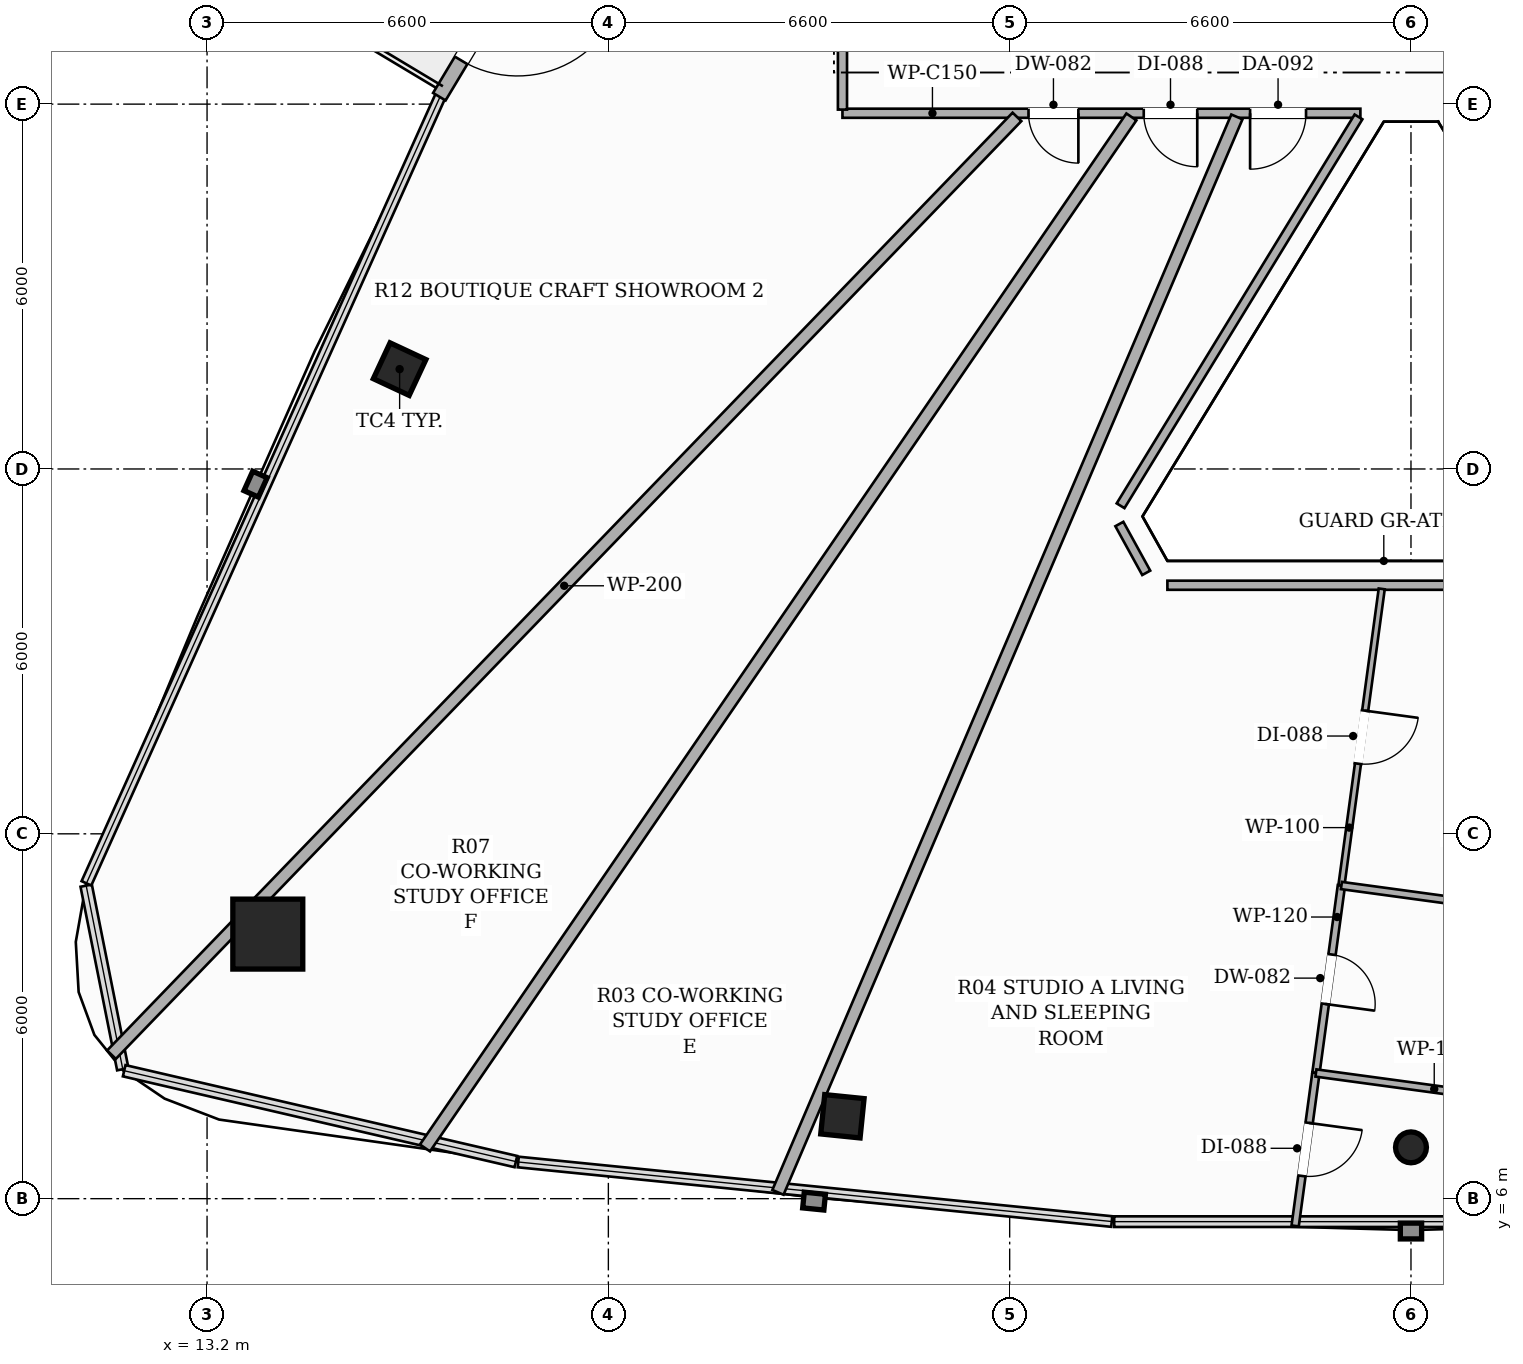
"""IFC4 building model, lengths in metres.
Left out: names, types, materials, properties, quantities, classifications, styles, units other than length and angle.
Written with IfcOpenShell. Run it as: python <this file> out.ifc"""

import sys

from ifc_helpers import new_model, si_unit, direction, frame, frame_2d, origin, origin_2d, place, context, subcontext, project, spatial, rectangle, hollow_rectangle, hollow_circle, extrude, element, fill, save


model = new_model("IFC4")
c1 = context("Model", 3, precision=1e-05, world=origin(), true_north=direction((0.0, 1.0)))
c2 = subcontext(c1, "Body", "Model", "MODEL_VIEW")
j1 = project(units=[si_unit("LENGTHUNIT", "METRE"), si_unit("PLANEANGLEUNIT", "RADIAN")], contexts=[c1])
p1 = place(None, origin())
s1 = spatial("IfcSite", under=j1, at=p1, CompositionType="ELEMENT")
p2 = place(p1, origin())
s2 = spatial("IfcBuilding", under=s1, at=p2, CompositionType="ELEMENT")
p3 = place(p2, frame((0.0, 0.0, 260.15)))
s3 = spatial("IfcBuildingStorey", under=s2, at=p3, CompositionType="ELEMENT", Elevation=260.15)
p4 = place(p3, frame((14.199, 10.351, 0.0), z_axis=(0.0, 0.0, 1.0), x_axis=(1.0, 0.0, 0.0)))
e1 = element("IfcColumn", 1, at=p4, inside=s3, PredefinedType="COLUMN", context=c2, shape_type="SweptSolid", body=[
    extrude(hollow_rectangle(XDim=1.15, YDim=1.15, WallThickness=0.036, at=origin_2d()), origin(), (0.0, 0.0, 1.0), 3.3),
])
for number, where, z_axis, x_axis in (
    (2, (16.367, 19.642, 0.0), (0.0, 0.0, 1.0), (0.423, 0.906, 0.0)),
    (3, (23.649, 7.355, 0.0), (0.0, 0.0, 1.0), (-0.995, 0.101, 0.0)),
):
    element("IfcColumn", number, at=place(p3, frame(where, z_axis=z_axis, x_axis=x_axis)), inside=s3, PredefinedType="COLUMN", context=c2, shape_type="SweptSolid", body=[
        extrude(hollow_rectangle(XDim=0.65, YDim=0.65, WallThickness=0.022, at=origin_2d()), origin(), (0.0, 0.0, 1.0), 3.3),
    ])
p5 = place(p3, frame((33.0, 6.844, 0.0), z_axis=(0.0, 0.0, 1.0), x_axis=(1.0, 0.0, 0.0)))
e4 = element("IfcColumn", 4, at=p5, inside=s3, PredefinedType="COLUMN", context=c2, shape_type="SweptSolid", body=[
    extrude(hollow_circle(Radius=0.254, WallThickness=0.016, at=origin_2d()), origin(), (0.0, 0.0, 1.0), 3.3),
])
p6 = place(p3, frame((21.988, 32.405, 0.0), z_axis=(0.0, 0.0, 1.0), x_axis=(-0.514361929684, -0.857573206958, 0.0)))
e5 = element("IfcWall", 5, at=p6, inside=s3, PredefinedType="SOLIDWALL", context=c2, shape_type="SweptSolid", body=[
    extrude(rectangle(XDim=9.659, YDim=0.24, at=frame_2d((4.829, 0.0))), origin(), (0.0, 0.0, 1.0), 2.624),
])
p7 = place(p6, frame((7.162, 0.0, 0.0)))
e6 = element("IfcOpeningElement", 6, at=p7, cuts=e5, PredefinedType="OPENING", context=c2, shape_type="SweptSolid", body=[
    extrude(rectangle(XDim=1.8, YDim=2.2, at=frame_2d((0.9, 1.1))), frame((0.0, 0.13, 0.0), z_axis=(0.0, -1.0, 0.0), x_axis=(1.0, 0.0, 0.0)), (0.0, 0.0, 1.0), 0.26),
])
p8 = place(p3, frame((32.168, 23.85, 0.0), z_axis=(0.0, 0.0, 1.0), x_axis=(-1.0, 0.0, 0.0)))
e7 = element("IfcWall", 7, at=p8, inside=s3, PredefinedType="PARTITIONING", context=c2, shape_type="SweptSolid", body=[
    extrude(rectangle(XDim=8.518, YDim=0.15, at=frame_2d((4.259, 0.0))), origin(), (0.0, 0.0, 1.0), 2.565),
])
p9 = place(p8, frame((0.894, 0.0, 0.0)))
e8 = element("IfcOpeningElement", 8, at=p9, cuts=e7, PredefinedType="OPENING", context=c2, shape_type="SweptSolid", body=[
    extrude(rectangle(XDim=0.92, YDim=2.15, at=frame_2d((0.46, 1.075))), frame((0.0, 0.085, 0.0), z_axis=(0.0, -1.0, 0.0), x_axis=(1.0, 0.0, 0.0)), (0.0, 0.0, 1.0), 0.17),
])
p10 = place(p8, frame((2.683, 0.0, 0.0)))
e9 = element("IfcOpeningElement", 9, at=p10, cuts=e7, PredefinedType="OPENING", context=c2, shape_type="SweptSolid", body=[
    extrude(rectangle(XDim=0.88, YDim=2.1, at=frame_2d((0.44, 1.05))), frame((0.0, 0.085, 0.0), z_axis=(0.0, -1.0, 0.0), x_axis=(1.0, 0.0, 0.0)), (0.0, 0.0, 1.0), 0.17),
])
p11 = place(p8, frame((4.638, 0.0, 0.0)))
e10 = element("IfcOpeningElement", 10, at=p11, cuts=e7, PredefinedType="OPENING", context=c2, shape_type="SweptSolid", body=[
    extrude(rectangle(XDim=0.82, YDim=2.1, at=frame_2d((0.41, 1.05))), frame((0.0, 0.085, 0.0), z_axis=(0.0, -1.0, 0.0), x_axis=(1.0, 0.0, 0.0)), (0.0, 0.0, 1.0), 0.17),
])
p12 = place(p3, frame((23.65, 23.91, 0.0), z_axis=(0.0, 0.0, 1.0), x_axis=(0.0, 1.0, 0.0)))
e11 = element("IfcWall", 11, at=p12, inside=s3, PredefinedType="PARTITIONING", context=c2, shape_type="SweptSolid", body=[
    extrude(rectangle(XDim=10.784, YDim=0.15, at=frame_2d((5.392, 0.0))), origin(), (0.0, 0.0, 1.0), 2.492),
])
p13 = place(p12, frame((4.952, 0.0, 0.0)))
e12 = element("IfcOpeningElement", 12, at=p13, cuts=e11, PredefinedType="OPENING", context=c2, shape_type="SweptSolid", body=[
    extrude(rectangle(XDim=0.88, YDim=2.1, at=frame_2d((0.44, 1.05))), frame((0.0, 0.085, 0.0), z_axis=(0.0, -1.0, 0.0), x_axis=(1.0, 0.0, 0.0)), (0.0, 0.0, 1.0), 0.17),
])
p14 = place(p3, frame((37.006, 16.088, 0.0), z_axis=(0.0, 0.0, 1.0), x_axis=(-1.0, 0.0, 0.0)))
e13 = element("IfcWall", 13, at=p14, inside=s3, PredefinedType="PARTITIONING", context=c2, shape_type="SweptSolid", body=[
    extrude(rectangle(XDim=8.012, YDim=0.15, at=frame_2d((4.006, 0.0))), origin(), (0.0, 0.0, 1.0), 2.773),
])
p15 = place(p3, frame((28.646, 16.292, 0.0), z_axis=(0.0, 0.0, 1.0), x_axis=(-0.482133469033, 0.876097778811, 0.0)))
e14 = element("IfcWall", 14, at=p15, inside=s3, PredefinedType="PARTITIONING", context=c2, shape_type="SweptSolid", body=[
    extrude(rectangle(XDim=0.917, YDim=0.15, at=frame_2d((0.458, 0.0))), origin(), (0.0, 0.0, 1.0), 3.06),
])
p16 = place(p3, frame((28.224, 17.395, 0.0), z_axis=(0.0, 0.0, 1.0), x_axis=(0.521913594497, 0.852998358661, 0.0)))
e15 = element("IfcWall", 15, at=p16, inside=s3, PredefinedType="PARTITIONING", context=c2, shape_type="SweptSolid", body=[
    extrude(rectangle(XDim=7.497, YDim=0.15, at=frame_2d((3.749, 0.0))), origin(), (0.0, 0.0, 1.0), 2.773),
])
p17 = place(p3, frame((26.52, 23.79, 0.0), z_axis=(0.0, 0.0, 1.0), x_axis=(-0.694637190704, -0.719360252788, 0.0)))
e16 = element("IfcWall", 16, at=p17, inside=s3, PredefinedType="PARTITIONING", context=c2, shape_type="SweptSolid", body=[
    extrude(rectangle(XDim=21.439, YDim=0.2, at=frame_2d((10.719, 0.0))), origin(), (0.0, 0.0, 1.0), 2.492),
])
p18 = place(p3, frame((22.589, 6.104, 0.0), z_axis=(0.0, 0.0, 1.0), x_axis=(0.392518309842, 0.919744190761, 0.0)))
e17 = element("IfcWall", 17, at=p18, inside=s3, PredefinedType="PARTITIONING", context=c2, shape_type="SweptSolid", body=[
    extrude(rectangle(XDim=19.229, YDim=0.2, at=frame_2d((9.615, 0.0))), origin(), (0.0, 0.0, 1.0), 2.492),
])
p19 = place(p3, frame((16.784, 6.834, 0.0), z_axis=(0.0, 0.0, 1.0), x_axis=(0.565235631435, 0.824929500598, 0.0)))
e18 = element("IfcWall", 18, at=p19, inside=s3, PredefinedType="PARTITIONING", context=c2, shape_type="SweptSolid", body=[
    extrude(rectangle(XDim=20.554, YDim=0.2, at=frame_2d((10.277, 0.0))), origin(), (0.0, 0.0, 1.0), 2.492),
])
p20 = place(p3, frame((31.856, 11.15, 0.0), z_axis=(0.0, 0.0, 1.0), x_axis=(-0.134650977284, -0.990893089246, 0.0)))
e19 = element("IfcWall", 19, at=p20, inside=s3, PredefinedType="PARTITIONING", context=c2, shape_type="SweptSolid", body=[
    extrude(rectangle(XDim=3.111, YDim=0.12, at=frame_2d((1.556, 0.0))), origin(), (0.0, 0.0, 1.0), 3.06),
])
p21 = place(p20, frame((1.146, 0.0, 0.0)))
e20 = element("IfcOpeningElement", 20, at=p21, cuts=e19, PredefinedType="OPENING", context=c2, shape_type="SweptSolid", body=[
    extrude(rectangle(XDim=0.82, YDim=2.1, at=frame_2d((0.41, 1.05))), frame((0.0, 0.07, 0.0), z_axis=(0.0, -1.0, 0.0), x_axis=(1.0, 0.0, 0.0)), (0.0, 0.0, 1.0), 0.14),
])
p22 = place(p3, frame((31.437, 8.067, 0.0), z_axis=(0.0, 0.0, 1.0), x_axis=(-0.134765499074, -0.990877520312, 0.0)))
e21 = element("IfcWall", 21, at=p22, inside=s3, PredefinedType="PARTITIONING", context=c2, shape_type="SweptSolid", body=[
    extrude(rectangle(XDim=2.538, YDim=0.12, at=frame_2d((1.269, 0.0))), origin(), (0.0, 0.0, 1.0), 2.492),
])
p23 = place(p22, frame((0.829, 0.0, 0.0)))
e22 = element("IfcOpeningElement", 22, at=p23, cuts=e21, PredefinedType="OPENING", context=c2, shape_type="SweptSolid", body=[
    extrude(rectangle(XDim=0.88, YDim=2.1, at=frame_2d((0.44, 1.05))), frame((0.0, 0.07, 0.0), z_axis=(0.0, -1.0, 0.0), x_axis=(1.0, 0.0, 0.0)), (0.0, 0.0, 1.0), 0.14),
])
p24 = place(p3, frame((32.519, 16.028, 0.0), z_axis=(0.0, 0.0, 1.0), x_axis=(-0.134690507908, -0.990887716686, 0.0)))
e23 = element("IfcWall", 23, at=p24, inside=s3, PredefinedType="PARTITIONING", context=c2, shape_type="SweptSolid", body=[
    extrude(rectangle(XDim=4.923, YDim=0.1, at=frame_2d((2.461, 0.0))), origin(), (0.0, 0.0, 1.0), 3.06),
])
p25 = place(p24, frame((2.021, 0.0, 0.0)))
e24 = element("IfcOpeningElement", 24, at=p25, cuts=e23, PredefinedType="OPENING", context=c2, shape_type="SweptSolid", body=[
    extrude(rectangle(XDim=0.88, YDim=2.1, at=frame_2d((0.44, 1.05))), frame((0.0, 0.06, 0.0), z_axis=(0.0, -1.0, 0.0), x_axis=(1.0, 0.0, 0.0)), (0.0, 0.0, 1.0), 0.12),
])
p26 = place(p3, frame((35.328, 7.538, 0.0), z_axis=(0.0, 0.0, 1.0), x_axis=(-0.990890227425, 0.134672035678, 0.0)))
e25 = element("IfcWall", 25, at=p26, inside=s3, PredefinedType="PARTITIONING", context=c2, shape_type="SweptSolid", body=[
    extrude(rectangle(XDim=3.927, YDim=0.12, at=frame_2d((1.963, 0.0))), origin(), (0.0, 0.0, 1.0), 2.773),
])
p27 = place(p3, frame((31.856, 11.15, 0.0), z_axis=(0.0, 0.0, 1.0), x_axis=(0.990862518896, -0.13487575263, 0.0)))
e26 = element("IfcWall", 26, at=p27, inside=s3, PredefinedType="PARTITIONING", context=c2, shape_type="SweptSolid", body=[
    extrude(rectangle(XDim=3.166, YDim=0.12, at=frame_2d((1.583, 0.0))), origin(), (0.0, 0.0, 1.0), 2.773),
])
p28 = place(p7, origin())
e27 = element("IfcDoor", 27, at=p28, inside=s3, OperationType="SINGLE_SWING_LEFT", PredefinedType="DOOR", context=c2, shape_type="SweptSolid", body=[
    extrude(rectangle(XDim=1.8, YDim=2.2, at=frame_2d((0.9, 1.1))), frame((0.0, 0.025, 0.0), z_axis=(0.0, -1.0, 0.0), x_axis=(1.0, 0.0, 0.0)), (0.0, 0.0, 1.0), 0.05),
])
fill(e6, e27)
p29 = place(p9, origin())
e28 = element("IfcDoor", 28, at=p29, inside=s3, OperationType="SINGLE_SWING_RIGHT", PredefinedType="DOOR", context=c2, shape_type="SweptSolid", body=[
    extrude(rectangle(XDim=0.92, YDim=2.15, at=frame_2d((0.46, 1.075))), frame((0.0, 0.025, 0.0), z_axis=(0.0, -1.0, 0.0), x_axis=(1.0, 0.0, 0.0)), (0.0, 0.0, 1.0), 0.05),
])
fill(e8, e28)
p30 = place(p21, origin())
e29 = element("IfcDoor", 29, at=p30, inside=s3, OperationType="SINGLE_SWING_RIGHT", PredefinedType="DOOR", context=c2, shape_type="SweptSolid", body=[
    extrude(rectangle(XDim=0.82, YDim=2.1, at=frame_2d((0.41, 1.05))), frame((0.0, 0.025, 0.0), z_axis=(0.0, -1.0, 0.0), x_axis=(1.0, 0.0, 0.0)), (0.0, 0.0, 1.0), 0.05),
])
fill(e20, e29)
p31 = place(p23, origin())
e30 = element("IfcDoor", 30, at=p31, inside=s3, OperationType="SINGLE_SWING_LEFT", PredefinedType="DOOR", context=c2, shape_type="SweptSolid", body=[
    extrude(rectangle(XDim=0.88, YDim=2.1, at=frame_2d((0.44, 1.05))), frame((0.0, 0.025, 0.0), z_axis=(0.0, -1.0, 0.0), x_axis=(1.0, 0.0, 0.0)), (0.0, 0.0, 1.0), 0.05),
])
fill(e22, e30)
p32 = place(p25, origin())
e31 = element("IfcDoor", 31, at=p32, inside=s3, OperationType="SINGLE_SWING_LEFT", PredefinedType="DOOR", context=c2, shape_type="SweptSolid", body=[
    extrude(rectangle(XDim=0.88, YDim=2.1, at=frame_2d((0.44, 1.05))), frame((0.0, 0.025, 0.0), z_axis=(0.0, -1.0, 0.0), x_axis=(1.0, 0.0, 0.0)), (0.0, 0.0, 1.0), 0.05),
])
fill(e24, e31)
p33 = place(p10, origin())
e32 = element("IfcDoor", 32, at=p33, inside=s3, OperationType="SINGLE_SWING_LEFT", PredefinedType="DOOR", context=c2, shape_type="SweptSolid", body=[
    extrude(rectangle(XDim=0.88, YDim=2.1, at=frame_2d((0.44, 1.05))), frame((0.0, 0.025, 0.0), z_axis=(0.0, -1.0, 0.0), x_axis=(1.0, 0.0, 0.0)), (0.0, 0.0, 1.0), 0.05),
])
fill(e9, e32)
p34 = place(p11, origin())
e33 = element("IfcDoor", 33, at=p34, inside=s3, OperationType="SINGLE_SWING_LEFT", PredefinedType="DOOR", context=c2, shape_type="SweptSolid", body=[
    extrude(rectangle(XDim=0.82, YDim=2.1, at=frame_2d((0.41, 1.05))), frame((0.0, 0.025, 0.0), z_axis=(0.0, -1.0, 0.0), x_axis=(1.0, 0.0, 0.0)), (0.0, 0.0, 1.0), 0.05),
])
fill(e10, e33)
save(model, sys.argv[1])
